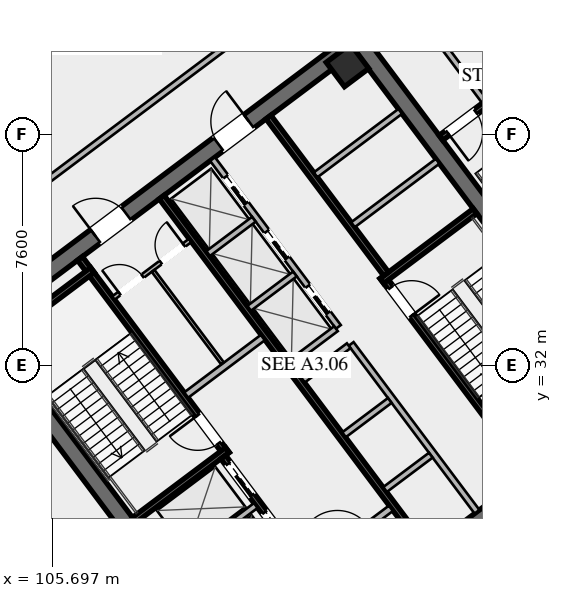
"""IFC4 building model, lengths in metres.
Left out: names, types, materials, properties, quantities, classifications, styles, units other than length and angle.
Written with IfcOpenShell. Run it as: python <this file> out.ifc"""

import sys

from ifc_helpers import new_model, si_unit, direction, frame, frame_2d, origin, origin_2d, place, context, subcontext, project, spatial, rectangle, hollow_rectangle, extrude, element, fill, save


model = new_model("IFC4")
c1 = context("Model", 3, precision=1e-05, world=origin(), true_north=direction((0.0, 1.0)))
c2 = subcontext(c1, "Body", "Model", "MODEL_VIEW")
j1 = project(units=[si_unit("LENGTHUNIT", "METRE"), si_unit("PLANEANGLEUNIT", "RADIAN")], contexts=[c1])
p1 = place(None, origin())
s1 = spatial("IfcSite", under=j1, at=p1, CompositionType="ELEMENT")
p2 = place(p1, origin())
s2 = spatial("IfcBuilding", under=s1, at=p2, CompositionType="ELEMENT")
p3 = place(p2, frame((0.0, 0.0, 109.8)))
s3 = spatial("IfcBuildingStorey", under=s2, at=p3, CompositionType="ELEMENT", Elevation=109.8)
for number, where, z_axis, x_axis in (
    (1, (112.436, 21.077, 0.0), (0.0, 0.0, 1.0), (-0.6, 0.8, 0.0)),
    (2, (115.564, 42.923, 0.0), (0.0, 0.0, 1.0), (0.6, -0.8, 0.0)),
):
    element("IfcWall", number, at=place(p3, frame(where, z_axis=z_axis, x_axis=x_axis)), inside=s3, PredefinedType="SHEAR", context=c2, shape_type="SweptSolid", body=[
        extrude(rectangle(XDim=15.6, YDim=0.55, at=frame_2d((7.8, 0.0))), origin(), (0.0, 0.0, 1.0), 4.6),
    ])
p4 = place(p3, frame((124.539, 30.498, 0.0), z_axis=(0.0, 0.0, 1.0), x_axis=(-0.799998054672, -0.600002593761, 0.0)))
e3 = element("IfcWall", 3, at=p4, inside=s3, PredefinedType="SHEAR", context=c2, shape_type="SweptSolid", body=[
    extrude(rectangle(XDim=15.06, YDim=0.55, at=frame_2d((7.53, 0.0))), origin(), (0.0, 0.0, 1.0), 4.6),
])
p5 = place(p4, frame((9.23, 0.0, 0.0)))
e4 = element("IfcOpeningElement", 4, at=p5, cuts=e3, PredefinedType="OPENING", context=c2, shape_type="SweptSolid", body=[
    extrude(rectangle(XDim=1.25, YDim=2.25, at=frame_2d((0.625, 1.125))), frame((0.0, 0.285, 0.0), z_axis=(0.0, -1.0, 0.0), x_axis=(1.0, 0.0, 0.0)), (0.0, 0.0, 1.0), 0.57),
])
p6 = place(p4, frame((4.18, 0.0, 0.0)))
e5 = element("IfcOpeningElement", 5, at=p6, cuts=e3, PredefinedType="OPENING", context=c2, shape_type="SweptSolid", body=[
    extrude(rectangle(XDim=1.25, YDim=2.25, at=frame_2d((0.625, 1.125))), frame((0.0, 0.285, 0.0), z_axis=(0.0, -1.0, 0.0), x_axis=(1.0, 0.0, 0.0)), (0.0, 0.0, 1.0), 0.57),
])
p7 = place(p3, frame((103.461, 33.502, 0.0), z_axis=(0.0, 0.0, 1.0), x_axis=(0.799998054672, 0.600002593761, 0.0)))
e6 = element("IfcWall", 6, at=p7, inside=s3, PredefinedType="SHEAR", context=c2, shape_type="SweptSolid", body=[
    extrude(rectangle(XDim=15.06, YDim=0.55, at=frame_2d((7.53, 0.0))), origin(), (0.0, 0.0, 1.0), 4.6),
])
p8 = place(p7, frame((4.58, 0.0, 0.0)))
e7 = element("IfcOpeningElement", 7, at=p8, cuts=e6, PredefinedType="OPENING", context=c2, shape_type="SweptSolid", body=[
    extrude(rectangle(XDim=1.25, YDim=2.25, at=frame_2d((0.625, 1.125))), frame((0.0, 0.285, 0.0), z_axis=(0.0, -1.0, 0.0), x_axis=(1.0, 0.0, 0.0)), (0.0, 0.0, 1.0), 0.57),
])
p9 = place(p7, frame((9.63, 0.0, 0.0)))
e8 = element("IfcOpeningElement", 8, at=p9, cuts=e6, PredefinedType="OPENING", context=c2, shape_type="SweptSolid", body=[
    extrude(rectangle(XDim=1.25, YDim=2.25, at=frame_2d((0.625, 1.125))), frame((0.0, 0.285, 0.0), z_axis=(0.0, -1.0, 0.0), x_axis=(1.0, 0.0, 0.0)), (0.0, 0.0, 1.0), 0.57),
])
p10 = place(p3, frame((115.41, 41.87, 0.0), z_axis=(0.0, 0.0, 1.0), x_axis=(0.799999996291, 0.600000004945, 0.0)))
e9 = element("IfcColumn", 9, at=p10, inside=s3, PredefinedType="COLUMN", context=c2, shape_type="SweptSolid", body=[
    extrude(hollow_rectangle(XDim=1.0, YDim=1.0, WallThickness=0.04, at=origin_2d()), origin(), (0.0, 0.0, 1.0), 4.42),
])
for number, where, z_axis, x_axis in (
    (10, (137.672, 26.904, 0.0), (0.0, 0.0, 1.0), (-0.8, -0.6, 0.0)),
    (11, (108.904, 8.328, 0.0), (0.0, 0.0, 1.0), (-0.6, 0.8, 0.0)),
    (12, (90.328, 37.096, 0.0), (0.0, 0.0, 1.0), (0.8, 0.6, 0.0)),
    (13, (119.096, 55.672, 0.0), (0.0, 0.0, 1.0), (0.6, -0.8, 0.0)),
):
    element("IfcWall", number, at=place(p3, frame(where, z_axis=z_axis, x_axis=x_axis)), inside=s3, PredefinedType="SOLIDWALL", context=c2, shape_type="SweptSolid", body=[
        extrude(rectangle(XDim=31.76, YDim=0.28, at=frame_2d((15.88, 0.0))), origin(), (0.0, 0.0, 1.0), 4.42),
    ])
p11 = place(p3, frame((111.44, 29.08, 0.0), z_axis=(0.0, 0.0, 1.0), x_axis=(-0.59999029481, 0.8000072788, 0.0)))
e14 = element("IfcWall", 14, at=p11, inside=s3, PredefinedType="SHEAR", context=c2, shape_type="SweptSolid", body=[
    extrude(rectangle(XDim=8.05, YDim=0.2, at=frame_2d((4.025, 0.0))), origin(), (0.0, 0.0, 1.0), 4.42),
])
p12 = place(p11, frame((0.45, 0.0, 0.0)))
e15 = element("IfcOpeningElement", 15, at=p12, cuts=e14, PredefinedType="OPENING", context=c2, shape_type="SweptSolid", body=[
    extrude(rectangle(XDim=1.15, YDim=2.2, at=frame_2d((0.575, 1.1))), frame((0.0, 0.11, 0.0), z_axis=(0.0, -1.0, 0.0), x_axis=(1.0, 0.0, 0.0)), (0.0, 0.0, 1.0), 0.22),
])
for number, where, z_axis, x_axis in (
    (16, (108.396, 26.922, 0.0), (0.0, 0.0, 1.0), (0.8, 0.6, 0.0)),
    (17, (103.956, 32.842, 0.0), (0.0, 0.0, 1.0), (0.8, 0.6, 0.0)),
):
    element("IfcWall", number, at=place(p3, frame(where, z_axis=z_axis, x_axis=x_axis)), inside=s3, PredefinedType="SHEAR", context=c2, shape_type="SweptSolid", body=[
        extrude(rectangle(XDim=3.83, YDim=0.2, at=frame_2d((1.915, 0.0))), origin(), (0.0, 0.0, 1.0), 4.42),
    ])
p13 = place(p3, frame((116.56, 34.92, 0.0), z_axis=(0.0, 0.0, 1.0), x_axis=(0.59999029481, -0.8000072788, 0.0)))
e18 = element("IfcWall", 18, at=p13, inside=s3, PredefinedType="SHEAR", context=c2, shape_type="SweptSolid", body=[
    extrude(rectangle(XDim=8.05, YDim=0.2, at=frame_2d((4.025, 0.0))), origin(), (0.0, 0.0, 1.0), 4.42),
])
p14 = place(p13, frame((0.45, 0.0, 0.0)))
e19 = element("IfcOpeningElement", 19, at=p14, cuts=e18, PredefinedType="OPENING", context=c2, shape_type="SweptSolid", body=[
    extrude(rectangle(XDim=1.15, YDim=2.2, at=frame_2d((0.575, 1.1))), frame((0.0, 0.11, 0.0), z_axis=(0.0, -1.0, 0.0), x_axis=(1.0, 0.0, 0.0)), (0.0, 0.0, 1.0), 0.22),
])
p15 = place(p3, frame((116.54, 34.78, 0.0), z_axis=(0.0, 0.0, 1.0), x_axis=(0.800015298837, 0.599979601008, 0.0)))
e20 = element("IfcWall", 20, at=p15, inside=s3, PredefinedType="SHEAR", context=c2, shape_type="SweptSolid", body=[
    extrude(rectangle(XDim=3.83, YDim=0.2, at=frame_2d((1.915, 0.0))), origin(), (0.0, 0.0, 1.0), 4.42),
])
p16 = place(p3, frame((117.998, 25.936, 0.0), z_axis=(0.0, 0.0, 1.0), x_axis=(-0.600002693989, 0.799997979501, 0.0)))
e21 = element("IfcWall", 21, at=p16, inside=s3, PredefinedType="SHEAR", context=c2, shape_type="SweptSolid", body=[
    extrude(rectangle(XDim=14.5, YDim=0.2, at=frame_2d((7.25, 0.0))), origin(), (0.0, 0.0, 1.0), 4.42),
])
p17 = place(p3, frame((110.104, 31.028, 0.0), z_axis=(0.0, 0.0, 1.0), x_axis=(0.800018601094, 0.59997519774, 0.0)))
e22 = element("IfcWall", 22, at=p17, inside=s3, PredefinedType="SOLIDWALL", context=c2, shape_type="SweptSolid", body=[
    extrude(rectangle(XDim=3.15, YDim=0.22, at=frame_2d((1.575, 0.0))), origin(), (0.0, 0.0, 1.0), 3.531),
])
p18 = place(p3, frame((114.316, 25.412, 0.0), z_axis=(0.0, 0.0, 1.0), x_axis=(0.800018601094, 0.59997519774, 0.0)))
e23 = element("IfcWall", 23, at=p18, inside=s3, PredefinedType="SOLIDWALL", context=c2, shape_type="SweptSolid", body=[
    extrude(rectangle(XDim=3.15, YDim=0.22, at=frame_2d((1.575, 0.0))), origin(), (0.0, 0.0, 1.0), 3.531),
])
p19 = place(p18, frame((0.95, 0.0, 0.0)))
e24 = element("IfcOpeningElement", 24, at=p19, cuts=e23, PredefinedType="OPENING", context=c2, shape_type="SweptSolid", body=[
    extrude(rectangle(XDim=1.25, YDim=2.25, at=frame_2d((0.625, 1.125))), frame((0.0, 0.12, 0.0), z_axis=(0.0, -1.0, 0.0), x_axis=(1.0, 0.0, 0.0)), (0.0, 0.0, 1.0), 0.24),
])
p20 = place(p3, frame((115.19, 23.83, 0.0), z_axis=(0.0, 0.0, 1.0), x_axis=(-0.599993943644, 0.800004542231, 0.0)))
e25 = element("IfcWall", 25, at=p20, inside=s3, PredefinedType="SHEAR", context=c2, shape_type="SweptSolid", body=[
    extrude(rectangle(XDim=6.45, YDim=0.2, at=frame_2d((3.225, 0.0))), origin(), (0.0, 0.0, 1.0), 4.42),
])
p21 = place(p20, frame((4.875, 0.0, 0.0)))
e26 = element("IfcOpeningElement", 26, at=p21, cuts=e25, PredefinedType="OPENING", context=c2, shape_type="SweptSolid", body=[
    extrude(rectangle(XDim=1.3, YDim=2.25, at=frame_2d((0.65, 1.125))), frame((0.0, 0.11, 0.0), z_axis=(0.0, -1.0, 0.0), x_axis=(1.0, 0.0, 0.0)), (0.0, 0.0, 1.0), 0.22),
])
p22 = place(p20, frame((2.875, 0.0, 0.0)))
e27 = element("IfcOpeningElement", 27, at=p22, cuts=e25, PredefinedType="OPENING", context=c2, shape_type="SweptSolid", body=[
    extrude(rectangle(XDim=1.3, YDim=2.25, at=frame_2d((0.65, 1.125))), frame((0.0, 0.11, 0.0), z_axis=(0.0, -1.0, 0.0), x_axis=(1.0, 0.0, 0.0)), (0.0, 0.0, 1.0), 0.22),
])
p23 = place(p20, frame((0.675, 0.0, 0.0)))
e28 = element("IfcOpeningElement", 28, at=p23, cuts=e25, PredefinedType="OPENING", context=c2, shape_type="SweptSolid", body=[
    extrude(rectangle(XDim=1.3, YDim=2.25, at=frame_2d((0.65, 1.125))), frame((0.0, 0.11, 0.0), z_axis=(0.0, -1.0, 0.0), x_axis=(1.0, 0.0, 0.0)), (0.0, 0.0, 1.0), 0.22),
])
p24 = place(p3, frame((109.608, 25.306, 0.0), z_axis=(0.0, 0.0, 1.0), x_axis=(0.8, 0.6, 0.0)))
e29 = element("IfcWall", 29, at=p24, inside=s3, PredefinedType="SOLIDWALL", context=c2, shape_type="SweptSolid", body=[
    extrude(rectangle(XDim=3.48, YDim=0.2, at=frame_2d((1.74, 0.0))), origin(), (0.0, 0.0, 1.0), 4.42),
])
p25 = place(p3, frame((112.81, 40.17, 0.0), z_axis=(0.0, 0.0, 1.0), x_axis=(0.599993943644, -0.800004542231, 0.0)))
e30 = element("IfcWall", 30, at=p25, inside=s3, PredefinedType="SHEAR", context=c2, shape_type="SweptSolid", body=[
    extrude(rectangle(XDim=6.45, YDim=0.2, at=frame_2d((3.225, 0.0))), origin(), (0.0, 0.0, 1.0), 4.42),
])
for number, where, z_axis, x_axis in (
    (31, (115.59, 36.63, 0.0), (0.0, 0.0, 1.0), (0.8, 0.6, 0.0)),
    (32, (114.36, 38.27, 0.0), (0.0, 0.0, 1.0), (0.8, 0.6, 0.0)),
):
    element("IfcWall", number, at=place(p3, frame(where, z_axis=z_axis, x_axis=x_axis)), inside=s3, PredefinedType="SOLIDWALL", context=c2, shape_type="SweptSolid", body=[
        extrude(rectangle(XDim=3.48, YDim=0.2, at=frame_2d((1.74, 0.0))), origin(), (0.0, 0.0, 1.0), 4.42),
    ])
p26 = place(p3, frame((107.71, 34.22, 0.0), z_axis=(0.0, 0.0, 1.0), x_axis=(0.799981399002, 0.60002480053, 0.0)))
e33 = element("IfcWall", 33, at=p26, inside=s3, PredefinedType="PARTITIONING", context=c2, shape_type="SweptSolid", body=[
    extrude(rectangle(XDim=3.15, YDim=0.135, at=frame_2d((1.575, 0.0))), origin(), (0.0, 0.0, 1.0), 3.531),
])
p27 = place(p26, frame((0.25, 0.0, 0.0)))
e34 = element("IfcOpeningElement", 34, at=p27, cuts=e33, PredefinedType="OPENING", context=c2, shape_type="SweptSolid", body=[
    extrude(rectangle(XDim=0.95, YDim=2.05, at=frame_2d((0.475, 1.025))), frame((0.0, 0.077, 0.0), z_axis=(0.0, -1.0, 0.0), x_axis=(1.0, 0.0, 0.0)), (0.0, 0.0, 1.0), 0.155),
])
p28 = place(p26, frame((1.95, 0.0, 0.0)))
e35 = element("IfcOpeningElement", 35, at=p28, cuts=e33, PredefinedType="OPENING", context=c2, shape_type="SweptSolid", body=[
    extrude(rectangle(XDim=0.95, YDim=2.05, at=frame_2d((0.475, 1.025))), frame((0.0, 0.077, 0.0), z_axis=(0.0, -1.0, 0.0), x_axis=(1.0, 0.0, 0.0)), (0.0, 0.0, 1.0), 0.155),
])
p29 = place(p3, frame((111.296, 32.072, 0.0), z_axis=(0.0, 0.0, 1.0), x_axis=(-0.59995887973, 0.800030838552, 0.0)))
e36 = element("IfcWall", 36, at=p29, inside=s3, PredefinedType="PARTITIONING", context=c2, shape_type="SweptSolid", body=[
    extrude(rectangle(XDim=3.8, YDim=0.11, at=frame_2d((1.9, 0.0))), origin(), (0.0, 0.0, 1.0), 3.531),
])
p30 = place(p3, frame((119.67, 27.19, 0.0), z_axis=(0.0, 0.0, 1.0), x_axis=(-0.599988677396, 0.800008491828, 0.0)))
e37 = element("IfcWall", 37, at=p30, inside=s3, PredefinedType="SOLIDWALL", context=c2, shape_type="SweptSolid", body=[
    extrude(rectangle(XDim=6.9, YDim=0.2, at=frame_2d((3.45, 0.0))), origin(), (0.0, 0.0, 1.0), 4.42),
])
p31 = place(p3, frame((116.646, 27.922, 0.0), z_axis=(0.0, 0.0, 1.0), x_axis=(0.8, 0.6, 0.0)))
e38 = element("IfcWall", 38, at=p31, inside=s3, PredefinedType="SOLIDWALL", context=c2, shape_type="SweptSolid", body=[
    extrude(rectangle(XDim=1.88, YDim=0.2, at=frame_2d((0.94, 0.0))), origin(), (0.0, 0.0, 1.0), 4.42),
])
p32 = place(p3, frame((115.296, 29.722, 0.0), z_axis=(0.0, 0.0, 1.0), x_axis=(0.799984418148, 0.600020775241, 0.0)))
e39 = element("IfcWall", 39, at=p32, inside=s3, PredefinedType="SOLIDWALL", context=c2, shape_type="SweptSolid", body=[
    extrude(rectangle(XDim=1.88, YDim=0.2, at=frame_2d((0.94, 0.0))), origin(), (0.0, 0.0, 1.0), 4.42),
])
p33 = place(p3, frame((113.946, 31.522, 0.0), z_axis=(0.0, 0.0, 1.0), x_axis=(0.8, 0.6, 0.0)))
e40 = element("IfcWall", 40, at=p33, inside=s3, PredefinedType="SOLIDWALL", context=c2, shape_type="SweptSolid", body=[
    extrude(rectangle(XDim=1.88, YDim=0.2, at=frame_2d((0.94, 0.0))), origin(), (0.0, 0.0, 1.0), 4.42),
])
p34 = place(p3, frame((115.11, 33.27, 0.0), z_axis=(0.0, 0.0, 1.0), x_axis=(-0.600011322243, 0.799991508192, 0.0)))
e41 = element("IfcWall", 41, at=p34, inside=s3, PredefinedType="SOLIDWALL", context=c2, shape_type="SweptSolid", body=[
    extrude(rectangle(XDim=6.9, YDim=0.2, at=frame_2d((3.45, 0.0))), origin(), (0.0, 0.0, 1.0), 4.42),
])
p35 = place(p34, frame((0.575, 0.0, 0.0)))
e42 = element("IfcOpeningElement", 42, at=p35, cuts=e41, PredefinedType="OPENING", context=c2, shape_type="SweptSolid", body=[
    extrude(rectangle(XDim=1.1, YDim=2.2, at=frame_2d((0.55, 1.1))), frame((0.0, 0.11, 0.0), z_axis=(0.0, -1.0, 0.0), x_axis=(1.0, 0.0, 0.0)), (0.0, 0.0, 1.0), 0.22),
])
p36 = place(p34, frame((2.825, 0.0, 0.0)))
e43 = element("IfcOpeningElement", 43, at=p36, cuts=e41, PredefinedType="OPENING", context=c2, shape_type="SweptSolid", body=[
    extrude(rectangle(XDim=1.1, YDim=2.2, at=frame_2d((0.55, 1.1))), frame((0.0, 0.11, 0.0), z_axis=(0.0, -1.0, 0.0), x_axis=(1.0, 0.0, 0.0)), (0.0, 0.0, 1.0), 0.22),
])
p37 = place(p34, frame((5.075, 0.0, 0.0)))
e44 = element("IfcOpeningElement", 44, at=p37, cuts=e41, PredefinedType="OPENING", context=c2, shape_type="SweptSolid", body=[
    extrude(rectangle(XDim=1.1, YDim=2.2, at=frame_2d((0.55, 1.1))), frame((0.0, 0.11, 0.0), z_axis=(0.0, -1.0, 0.0), x_axis=(1.0, 0.0, 0.0)), (0.0, 0.0, 1.0), 0.22),
])
p38 = place(p3, frame((113.526, 32.082, 0.0), z_axis=(0.0, 0.0, 1.0), x_axis=(0.800046745961, 0.599937666993, 0.0)))
e45 = element("IfcWall", 45, at=p38, inside=s3, PredefinedType="SOLIDWALL", context=c2, shape_type="SweptSolid", body=[
    extrude(rectangle(XDim=1.88, YDim=0.2, at=frame_2d((0.94, 0.0))), origin(), (0.0, 0.0, 1.0), 4.42),
])
p39 = place(p3, frame((112.176, 33.882, 0.0), z_axis=(0.0, 0.0, 1.0), x_axis=(0.8, 0.6, 0.0)))
e46 = element("IfcWall", 46, at=p39, inside=s3, PredefinedType="SOLIDWALL", context=c2, shape_type="SweptSolid", body=[
    extrude(rectangle(XDim=1.88, YDim=0.2, at=frame_2d((0.94, 0.0))), origin(), (0.0, 0.0, 1.0), 4.42),
])
p40 = place(p3, frame((110.826, 35.682, 0.0), z_axis=(0.0, 0.0, 1.0), x_axis=(0.799984418148, 0.600020775241, 0.0)))
e47 = element("IfcWall", 47, at=p40, inside=s3, PredefinedType="SOLIDWALL", context=c2, shape_type="SweptSolid", body=[
    extrude(rectangle(XDim=1.88, YDim=0.2, at=frame_2d((0.94, 0.0))), origin(), (0.0, 0.0, 1.0), 4.42),
])
p41 = place(p3, frame((121.204, 41.528, 0.0), z_axis=(0.0, 0.0, 1.0), x_axis=(-0.800017232136, -0.599977023131, 0.0)))
e48 = element("IfcWall", 48, at=p41, inside=s3, PredefinedType="SHEAR", context=c2, shape_type="SweptSolid", body=[
    extrude(rectangle(XDim=3.4, YDim=0.2, at=frame_2d((1.7, 0.0))), origin(), (0.0, 0.0, 1.0), 4.42),
])
p42 = place(p41, frame((1.975, 0.0, 0.0)))
e49 = element("IfcOpeningElement", 49, at=p42, cuts=e48, PredefinedType="OPENING", context=c2, shape_type="SweptSolid", body=[
    extrude(rectangle(XDim=1.15, YDim=2.2, at=frame_2d((0.575, 1.1))), frame((0.0, 0.11, 0.0), z_axis=(0.0, -1.0, 0.0), x_axis=(1.0, 0.0, 0.0)), (0.0, 0.0, 1.0), 0.22),
])
p43 = place(p3, frame((100.07, 33.99, 0.0), z_axis=(0.0, 0.0, 1.0), x_axis=(0.8, 0.6, 0.0)))
e50 = element("IfcWall", 50, at=p43, inside=s3, PredefinedType="SOLIDWALL", context=c2, shape_type="SweptSolid", body=[
    extrude(rectangle(XDim=19.9, YDim=0.2, at=frame_2d((9.95, 0.0))), origin(), (0.0, 0.0, 1.0), 3.531),
])
p44 = place(p43, frame((2.2, 0.0, 0.0)))
e51 = element("IfcOpeningElement", 51, at=p44, cuts=e50, PredefinedType="OPENING", context=c2, shape_type="SweptSolid", body=[
    extrude(rectangle(XDim=1.15, YDim=2.2, at=frame_2d((0.575, 1.1))), frame((0.0, 0.11, 0.0), z_axis=(0.0, -1.0, 0.0), x_axis=(1.0, 0.0, 0.0)), (0.0, 0.0, 1.0), 0.22),
])
p45 = place(p3, frame((127.93, 30.01, 0.0), z_axis=(0.0, 0.0, 1.0), x_axis=(-0.8, -0.6, 0.0)))
e52 = element("IfcWall", 52, at=p45, inside=s3, PredefinedType="SOLIDWALL", context=c2, shape_type="SweptSolid", body=[
    extrude(rectangle(XDim=19.9, YDim=0.2, at=frame_2d((9.95, 0.0))), origin(), (0.0, 0.0, 1.0), 3.531),
])
p46 = place(p45, frame((2.2, 0.0, 0.0)))
e53 = element("IfcOpeningElement", 53, at=p46, cuts=e52, PredefinedType="OPENING", context=c2, shape_type="SweptSolid", body=[
    extrude(rectangle(XDim=1.15, YDim=2.2, at=frame_2d((0.575, 1.1))), frame((0.0, 0.11, 0.0), z_axis=(0.0, -1.0, 0.0), x_axis=(1.0, 0.0, 0.0)), (0.0, 0.0, 1.0), 0.22),
])
p47 = place(p3, frame((116.062, 45.834, 0.0), z_axis=(0.0, 0.0, 1.0), x_axis=(0.599987849816, -0.800009112494, 0.0)))
e54 = element("IfcWall", 54, at=p47, inside=s3, PredefinedType="SOLIDWALL", context=c2, shape_type="SweptSolid", body=[
    extrude(rectangle(XDim=6.43, YDim=0.2, at=frame_2d((3.215, 0.0))), origin(), (0.0, 0.0, 1.0), 3.531),
])
p48 = place(p47, frame((3.0, 0.0, 0.0)))
e55 = element("IfcOpeningElement", 55, at=p48, cuts=e54, PredefinedType="OPENING", context=c2, shape_type="SweptSolid", body=[
    extrude(rectangle(XDim=1.25, YDim=2.25, at=frame_2d((0.625, 1.125))), frame((0.0, 0.11, 0.0), z_axis=(0.0, -1.0, 0.0), x_axis=(1.0, 0.0, 0.0)), (0.0, 0.0, 1.0), 0.22),
])
p49 = place(p3, frame((111.938, 18.166, 0.0), z_axis=(0.0, 0.0, 1.0), x_axis=(-0.59999602618, 0.80000298035, 0.0)))
e56 = element("IfcWall", 56, at=p49, inside=s3, PredefinedType="SOLIDWALL", context=c2, shape_type="SweptSolid", body=[
    extrude(rectangle(XDim=19.66, YDim=0.2, at=frame_2d((9.83, 0.0))), origin(), (0.0, 0.0, 1.0), 3.531),
])
p50 = place(p49, frame((3.0, 0.0, 0.0)))
e57 = element("IfcOpeningElement", 57, at=p50, cuts=e56, PredefinedType="OPENING", context=c2, shape_type="SweptSolid", body=[
    extrude(rectangle(XDim=1.25, YDim=2.25, at=frame_2d((0.625, 1.125))), frame((0.0, 0.11, 0.0), z_axis=(0.0, -1.0, 0.0), x_axis=(1.0, 0.0, 0.0)), (0.0, 0.0, 1.0), 0.22),
])
p51 = place(p49, frame((13.2, 0.0, 0.0)))
e58 = element("IfcOpeningElement", 58, at=p51, cuts=e56, PredefinedType="OPENING", context=c2, shape_type="SweptSolid", body=[
    extrude(rectangle(XDim=1.15, YDim=2.2, at=frame_2d((0.575, 1.1))), frame((0.0, 0.11, 0.0), z_axis=(0.0, -1.0, 0.0), x_axis=(1.0, 0.0, 0.0)), (0.0, 0.0, 1.0), 0.22),
])
p52 = place(p8, origin())
e59 = element("IfcDoor", 59, at=p52, inside=s3, OperationType="SINGLE_SWING_LEFT", PredefinedType="DOOR", context=c2, shape_type="SweptSolid", body=[
    extrude(rectangle(XDim=1.25, YDim=2.25, at=frame_2d((0.625, 1.125))), frame((0.0, 0.025, 0.0), z_axis=(0.0, -1.0, 0.0), x_axis=(1.0, 0.0, 0.0)), (0.0, 0.0, 1.0), 0.05),
])
fill(e7, e59)
p53 = place(p9, origin())
e60 = element("IfcDoor", 60, at=p53, inside=s3, OperationType="SINGLE_SWING_RIGHT", PredefinedType="DOOR", context=c2, shape_type="SweptSolid", body=[
    extrude(rectangle(XDim=1.25, YDim=2.25, at=frame_2d((0.625, 1.125))), frame((0.0, 0.025, 0.0), z_axis=(0.0, -1.0, 0.0), x_axis=(1.0, 0.0, 0.0)), (0.0, 0.0, 1.0), 0.05),
])
fill(e8, e60)
p54 = place(p12, origin())
e61 = element("IfcDoor", 61, at=p54, inside=s3, OperationType="SINGLE_SWING_RIGHT", PredefinedType="DOOR", context=c2, shape_type="SweptSolid", body=[
    extrude(rectangle(XDim=1.15, YDim=2.2, at=frame_2d((0.575, 1.1))), frame((0.0, 0.025, 0.0), z_axis=(0.0, -1.0, 0.0), x_axis=(1.0, 0.0, 0.0)), (0.0, 0.0, 1.0), 0.05),
])
fill(e15, e61)
p55 = place(p14, origin())
e62 = element("IfcDoor", 62, at=p55, inside=s3, OperationType="SINGLE_SWING_RIGHT", PredefinedType="DOOR", context=c2, shape_type="SweptSolid", body=[
    extrude(rectangle(XDim=1.15, YDim=2.2, at=frame_2d((0.575, 1.1))), frame((0.0, 0.025, 0.0), z_axis=(0.0, -1.0, 0.0), x_axis=(1.0, 0.0, 0.0)), (0.0, 0.0, 1.0), 0.05),
])
fill(e19, e62)
p56 = place(p27, origin())
e63 = element("IfcDoor", 63, at=p56, inside=s3, OperationType="SINGLE_SWING_LEFT", PredefinedType="DOOR", context=c2, shape_type="SweptSolid", body=[
    extrude(rectangle(XDim=0.95, YDim=2.05, at=frame_2d((0.475, 1.025))), frame((0.0, 0.025, 0.0), z_axis=(0.0, -1.0, 0.0), x_axis=(1.0, 0.0, 0.0)), (0.0, 0.0, 1.0), 0.05),
])
fill(e34, e63)
p57 = place(p28, origin())
e64 = element("IfcDoor", 64, at=p57, inside=s3, OperationType="SINGLE_SWING_RIGHT", PredefinedType="DOOR", context=c2, shape_type="SweptSolid", body=[
    extrude(rectangle(XDim=0.95, YDim=2.05, at=frame_2d((0.475, 1.025))), frame((0.0, 0.025, 0.0), z_axis=(0.0, -1.0, 0.0), x_axis=(1.0, 0.0, 0.0)), (0.0, 0.0, 1.0), 0.05),
])
fill(e35, e64)
p58 = place(p42, origin())
e65 = element("IfcDoor", 65, at=p58, inside=s3, OperationType="SINGLE_SWING_RIGHT", PredefinedType="DOOR", context=c2, shape_type="SweptSolid", body=[
    extrude(rectangle(XDim=1.15, YDim=2.2, at=frame_2d((0.575, 1.1))), frame((0.0, 0.025, 0.0), z_axis=(0.0, -1.0, 0.0), x_axis=(1.0, 0.0, 0.0)), (0.0, 0.0, 1.0), 0.05),
])
fill(e49, e65)
p59 = place(p21, origin())
e66 = element("IfcDoor", 66, at=p59, inside=s3, OperationType="SLIDING_TO_LEFT", PredefinedType="DOOR", context=c2, shape_type="SweptSolid", body=[
    extrude(rectangle(XDim=1.3, YDim=2.25, at=frame_2d((0.65, 1.125))), frame((0.0, 0.025, 0.0), z_axis=(0.0, -1.0, 0.0), x_axis=(1.0, 0.0, 0.0)), (0.0, 0.0, 1.0), 0.05),
])
fill(e26, e66)
p60 = place(p22, origin())
e67 = element("IfcDoor", 67, at=p60, inside=s3, OperationType="SLIDING_TO_LEFT", PredefinedType="DOOR", context=c2, shape_type="SweptSolid", body=[
    extrude(rectangle(XDim=1.3, YDim=2.25, at=frame_2d((0.65, 1.125))), frame((0.0, 0.025, 0.0), z_axis=(0.0, -1.0, 0.0), x_axis=(1.0, 0.0, 0.0)), (0.0, 0.0, 1.0), 0.05),
])
fill(e27, e67)
p61 = place(p35, origin())
e68 = element("IfcDoor", 68, at=p61, inside=s3, OperationType="SLIDING_TO_LEFT", PredefinedType="DOOR", context=c2, shape_type="SweptSolid", body=[
    extrude(rectangle(XDim=1.1, YDim=2.2, at=frame_2d((0.55, 1.1))), frame((0.0, 0.025, 0.0), z_axis=(0.0, -1.0, 0.0), x_axis=(1.0, 0.0, 0.0)), (0.0, 0.0, 1.0), 0.05),
])
fill(e42, e68)
p62 = place(p36, origin())
e69 = element("IfcDoor", 69, at=p62, inside=s3, OperationType="SLIDING_TO_LEFT", PredefinedType="DOOR", context=c2, shape_type="SweptSolid", body=[
    extrude(rectangle(XDim=1.1, YDim=2.2, at=frame_2d((0.55, 1.1))), frame((0.0, 0.025, 0.0), z_axis=(0.0, -1.0, 0.0), x_axis=(1.0, 0.0, 0.0)), (0.0, 0.0, 1.0), 0.05),
])
fill(e43, e69)
p63 = place(p37, origin())
e70 = element("IfcDoor", 70, at=p63, inside=s3, OperationType="SLIDING_TO_LEFT", PredefinedType="DOOR", context=c2, shape_type="SweptSolid", body=[
    extrude(rectangle(XDim=1.1, YDim=2.2, at=frame_2d((0.55, 1.1))), frame((0.0, 0.025, 0.0), z_axis=(0.0, -1.0, 0.0), x_axis=(1.0, 0.0, 0.0)), (0.0, 0.0, 1.0), 0.05),
])
fill(e44, e70)
save(model, sys.argv[1])
